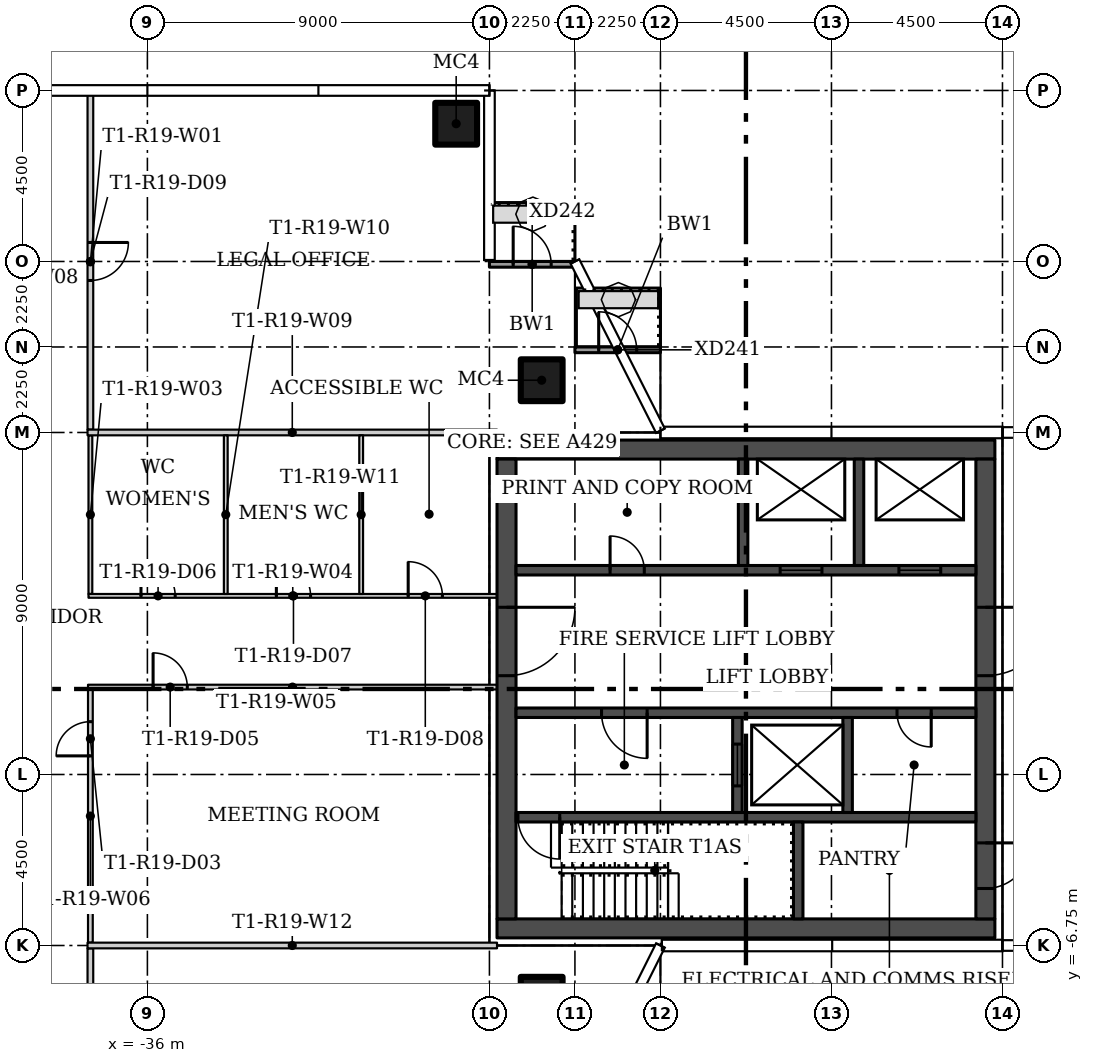
"""IFC4 building model, lengths in metres.
Left out: names, types, materials, properties, quantities, classifications, styles, units other than length and angle.
Written with IfcOpenShell. Run it as: python <this file> out.ifc"""

import sys

from ifc_helpers import new_model, si_unit, direction, frame, frame_2d, origin, origin_2d, place, context, subcontext, project, spatial, rectangle, hollow_rectangle, extrude, element, fill, save


model = new_model("IFC4")
c1 = context("Model", 3, precision=1e-05, world=origin(), true_north=direction((0.0, 1.0)))
c2 = subcontext(c1, "Body", "Model", "MODEL_VIEW")
j1 = project(units=[si_unit("LENGTHUNIT", "METRE"), si_unit("PLANEANGLEUNIT", "RADIAN")], contexts=[c1])
p1 = place(None, origin())
s1 = spatial("IfcSite", under=j1, at=p1, CompositionType="ELEMENT")
p2 = place(p1, origin())
s2 = spatial("IfcBuilding", under=s1, at=p2, CompositionType="ELEMENT")
p3 = place(p2, frame((0.0, 0.0, 170.1)))
s3 = spatial("IfcBuildingStorey", under=s2, at=p3, CompositionType="ELEMENT", Elevation=170.1)
for number, where in (
    (1, (-25.625, 8.125, 0.0)),
    (2, (-25.625, -8.125, 0.0)),
    (3, (-27.875, 14.875, 0.0)),
):
    element("IfcColumn", number, at=place(p3, frame(where)), inside=s3, PredefinedType="COLUMN", context=c2, shape_type="SweptSolid", body=[
        extrude(hollow_rectangle(XDim=1.1, YDim=1.1, WallThickness=0.04, at=origin_2d()), origin(), (0.0, 0.0, 1.0), 3.55),
    ])
p4 = place(p3, frame((-37.5, 15.655, 0.0), z_axis=(0.0, 0.0, 1.0), x_axis=(0.0, -1.0, 0.0)))
e4 = element("IfcWall", 4, at=p4, inside=s3, PredefinedType="PARTITIONING", context=c2, shape_type="SweptSolid", body=[
    extrude(rectangle(XDim=8.83, YDim=0.15, at=frame_2d((4.415, 0.0))), origin(), (0.0, 0.0, 1.0), 3.55),
])
p5 = place(p4, frame((3.905, 0.0, 0.0)))
e5 = element("IfcOpeningElement", 5, at=p5, cuts=e4, PredefinedType="OPENING", context=c2, shape_type="SweptSolid", body=[
    extrude(rectangle(XDim=1.0, YDim=2.4, at=frame_2d((0.5, 1.2))), frame((0.0, 0.085, 0.0), z_axis=(0.0, -1.0, 0.0), x_axis=(1.0, 0.0, 0.0)), (0.0, 0.0, 1.0), 0.17),
])
p6 = place(p3, frame((-37.5, -6.825, 0.0), z_axis=(0.0, 0.0, 1.0), x_axis=(0.0, -1.0, 0.0)))
e6 = element("IfcWall", 6, at=p6, inside=s3, PredefinedType="PARTITIONING", context=c2, shape_type="SweptSolid", body=[
    extrude(rectangle(XDim=13.33, YDim=0.15, at=frame_2d((6.665, 0.0))), origin(), (0.0, 0.0, 1.0), 3.55),
])
p7 = place(p6, frame((5.925, 0.0, 0.0)))
e7 = element("IfcOpeningElement", 7, at=p7, cuts=e6, PredefinedType="OPENING", context=c2, shape_type="SweptSolid", body=[
    extrude(rectangle(XDim=1.5, YDim=2.1, at=frame_2d((0.75, 1.05))), frame((0.0, 0.085, 0.0), z_axis=(0.0, -1.0, 0.0), x_axis=(1.0, 0.0, 0.0)), (0.0, 0.0, 1.0), 0.17),
])
p8 = place(p3, frame((-37.5, 6.675, 0.0), z_axis=(0.0, 0.0, 1.0), x_axis=(0.0, -1.0, 0.0)))
e8 = element("IfcWall", 8, at=p8, inside=s3, PredefinedType="PARTITIONING", context=c2, shape_type="SweptSolid", body=[
    extrude(rectangle(XDim=4.175, YDim=0.1, at=frame_2d((2.087, 0.0))), origin(), (0.0, 0.0, 1.0), 3.55),
])
p9 = place(p3, frame((-37.55, 2.45, 0.0)))
e9 = element("IfcWall", 9, at=p9, inside=s3, PredefinedType="PARTITIONING", context=c2, shape_type="SweptSolid", body=[
    extrude(rectangle(XDim=10.75, YDim=0.1, at=frame_2d((5.375, 0.0))), origin(), (0.0, 0.0, 1.0), 3.55),
])
p10 = place(p9, frame((1.381, 0.0, 0.0)))
e10 = element("IfcOpeningElement", 10, at=p10, cuts=e9, PredefinedType="OPENING", context=c2, shape_type="SweptSolid", body=[
    extrude(rectangle(XDim=0.9, YDim=2.1, at=frame_2d((0.45, 1.05))), frame((0.0, 0.06, 0.0), z_axis=(0.0, -1.0, 0.0), x_axis=(1.0, 0.0, 0.0)), (0.0, 0.0, 1.0), 0.12),
])
p11 = place(p9, frame((4.944, 0.0, 0.0)))
e11 = element("IfcOpeningElement", 11, at=p11, cuts=e9, PredefinedType="OPENING", context=c2, shape_type="SweptSolid", body=[
    extrude(rectangle(XDim=0.9, YDim=2.1, at=frame_2d((0.45, 1.05))), frame((0.0, 0.06, 0.0), z_axis=(0.0, -1.0, 0.0), x_axis=(1.0, 0.0, 0.0)), (0.0, 0.0, 1.0), 0.12),
])
p12 = place(p9, frame((8.413, 0.0, 0.0)))
e12 = element("IfcOpeningElement", 12, at=p12, cuts=e9, PredefinedType="OPENING", context=c2, shape_type="SweptSolid", body=[
    extrude(rectangle(XDim=0.9, YDim=2.1, at=frame_2d((0.45, 1.05))), frame((0.0, 0.06, 0.0), z_axis=(0.0, -1.0, 0.0), x_axis=(1.0, 0.0, 0.0)), (0.0, 0.0, 1.0), 0.12),
])
p13 = place(p3, frame((-37.562, 0.05, 0.0)))
e13 = element("IfcWall", 13, at=p13, inside=s3, PredefinedType="PARTITIONING", context=c2, shape_type="SweptSolid", body=[
    extrude(rectangle(XDim=10.762, YDim=0.125, at=frame_2d((5.381, 0.0))), origin(), (0.0, 0.0, 1.0), 3.55),
])
p14 = place(p13, frame((1.712, 0.0, 0.0)))
e14 = element("IfcOpeningElement", 14, at=p14, cuts=e13, PredefinedType="OPENING", context=c2, shape_type="SweptSolid", body=[
    extrude(rectangle(XDim=0.9, YDim=2.1, at=frame_2d((0.45, 1.05))), frame((0.0, 0.073, 0.0), z_axis=(0.0, -1.0, 0.0), x_axis=(1.0, 0.0, 0.0)), (0.0, 0.0, 1.0), 0.145),
])
p15 = place(p3, frame((-37.5, -6.675, 0.0), z_axis=(0.0, 0.0, 1.0), x_axis=(0.0, 1.0, 0.0)))
e15 = element("IfcWall", 15, at=p15, inside=s3, PredefinedType="PARTITIONING", context=c2, shape_type="SweptSolid", body=[
    extrude(rectangle(XDim=6.662, YDim=0.125, at=frame_2d((3.331, 0.0))), origin(), (0.0, 0.0, 1.0), 3.55),
])
p16 = place(p15, frame((4.915, 0.0, 0.0)))
e16 = element("IfcOpeningElement", 16, at=p16, cuts=e15, PredefinedType="OPENING", context=c2, shape_type="SweptSolid", body=[
    extrude(rectangle(XDim=0.9, YDim=2.1, at=frame_2d((0.45, 1.05))), frame((0.0, 0.073, 0.0), z_axis=(0.0, -1.0, 0.0), x_axis=(1.0, 0.0, 0.0)), (0.0, 0.0, 1.0), 0.145),
])
p17 = place(p3, frame((-37.575, 6.75, 0.0)))
e17 = element("IfcWall", 17, at=p17, inside=s3, PredefinedType="PARTITIONING", context=c2, shape_type="SweptSolid", body=[
    extrude(rectangle(XDim=10.775, YDim=0.15, at=frame_2d((5.387, 0.0))), origin(), (0.0, 0.0, 1.0), 3.55),
])
for number, where, z_axis, x_axis in (
    (18, (-33.938, 2.5, 0.0), (0.0, 0.0, 1.0), (0.0, 1.0, 0.0)),
    (19, (-30.375, 2.5, 0.0), (0.0, 0.0, 1.0), (0.0, 1.0, 0.0)),
):
    element("IfcWall", number, at=place(p3, frame(where, z_axis=z_axis, x_axis=x_axis)), inside=s3, PredefinedType="PARTITIONING", context=c2, shape_type="SweptSolid", body=[
        extrude(rectangle(XDim=4.175, YDim=0.1, at=frame_2d((2.087, 0.0))), origin(), (0.0, 0.0, 1.0), 3.55),
    ])
p18 = place(p3, frame((-26.8, -6.75, 0.0), z_axis=(0.0, 0.0, 1.0), x_axis=(-1.0, 0.0, 0.0)))
e20 = element("IfcWall", 20, at=p18, inside=s3, PredefinedType="PARTITIONING", context=c2, shape_type="SweptSolid", body=[
    extrude(rectangle(XDim=10.775, YDim=0.15, at=frame_2d((5.387, 0.0))), origin(), (0.0, 0.0, 1.0), 3.55),
])
p19 = place(p3, frame((-24.75, 8.925, 0.0)))
e21 = element("IfcWall", 21, at=p19, inside=s3, PredefinedType="SOLIDWALL", context=c2, shape_type="SweptSolid", body=[
    extrude(rectangle(XDim=2.25, YDim=0.15, at=frame_2d((1.125, 0.0))), origin(), (0.0, 0.0, 1.0), 3.45),
])
p20 = place(p19, frame((0.625, 0.0, 0.0)))
e22 = element("IfcOpeningElement", 22, at=p20, cuts=e21, PredefinedType="OPENING", context=c2, shape_type="SweptSolid", body=[
    extrude(rectangle(XDim=1.0, YDim=2.4, at=frame_2d((0.5, 1.2))), frame((0.0, 0.085, 0.0), z_axis=(0.0, -1.0, 0.0), x_axis=(1.0, 0.0, 0.0)), (0.0, 0.0, 1.0), 0.17),
])
p21 = place(p3, frame((-27.0, 11.175, 0.0)))
e23 = element("IfcWall", 23, at=p21, inside=s3, PredefinedType="SOLIDWALL", context=c2, shape_type="SweptSolid", body=[
    extrude(rectangle(XDim=2.25, YDim=0.15, at=frame_2d((1.125, 0.0))), origin(), (0.0, 0.0, 1.0), 3.45),
])
p22 = place(p21, frame((0.625, 0.0, 0.0)))
e24 = element("IfcOpeningElement", 24, at=p22, cuts=e23, PredefinedType="OPENING", context=c2, shape_type="SweptSolid", body=[
    extrude(rectangle(XDim=1.0, YDim=2.4, at=frame_2d((0.5, 1.2))), frame((0.0, 0.085, 0.0), z_axis=(0.0, -1.0, 0.0), x_axis=(1.0, 0.0, 0.0)), (0.0, 0.0, 1.0), 0.17),
])
for number, where in (
    (25, (-26.8, -6.3, 0.0)),
    (26, (-26.8, 6.3, 0.0)),
):
    element("IfcWall", number, at=place(p3, frame(where)), inside=s3, PredefinedType="SHEAR", context=c2, shape_type="SweptSolid", body=[
        extrude(rectangle(XDim=13.1, YDim=0.5, at=frame_2d((6.55, 0.0))), origin(), (0.0, 0.0, 1.0), 3.55),
    ])
p23 = place(p3, frame((-26.55, 6.05, 0.0), z_axis=(0.0, 0.0, 1.0), x_axis=(0.0, -1.0, 0.0)))
e27 = element("IfcWall", 27, at=p23, inside=s3, PredefinedType="SHEAR", context=c2, shape_type="SweptSolid", body=[
    extrude(rectangle(XDim=12.1, YDim=0.5, at=frame_2d((6.05, 0.0))), origin(), (0.0, 0.0, 1.0), 3.55),
])
p24 = place(p23, frame((3.9, 0.0, 0.0)))
e28 = element("IfcOpeningElement", 28, at=p24, cuts=e27, PredefinedType="OPENING", context=c2, shape_type="SweptSolid", body=[
    extrude(rectangle(XDim=1.8, YDim=2.4, at=frame_2d((0.9, 1.2))), frame((0.0, 0.26, 0.0), z_axis=(0.0, -1.0, 0.0), x_axis=(1.0, 0.0, 0.0)), (0.0, 0.0, 1.0), 0.52),
])
p25 = place(p3, frame((-13.95, 6.05, 0.0), z_axis=(0.0, 0.0, 1.0), x_axis=(0.0, -1.0, 0.0)))
e29 = element("IfcWall", 29, at=p25, inside=s3, PredefinedType="SHEAR", context=c2, shape_type="SweptSolid", body=[
    extrude(rectangle(XDim=12.1, YDim=0.5, at=frame_2d((6.05, 0.0))), origin(), (0.0, 0.0, 1.0), 3.55),
])
p26 = place(p25, frame((10.1, 0.0, 0.0)))
e30 = element("IfcOpeningElement", 30, at=p26, cuts=e29, PredefinedType="OPENING", context=c2, shape_type="SweptSolid", body=[
    extrude(rectangle(XDim=1.2, YDim=2.1, at=frame_2d((0.6, 1.05))), frame((0.0, 0.26, 0.0), z_axis=(0.0, -1.0, 0.0), x_axis=(1.0, 0.0, 0.0)), (0.0, 0.0, 1.0), 0.52),
])
p27 = place(p25, frame((3.9, 0.0, 0.0)))
e31 = element("IfcOpeningElement", 31, at=p27, cuts=e29, PredefinedType="OPENING", context=c2, shape_type="SweptSolid", body=[
    extrude(rectangle(XDim=1.8, YDim=2.4, at=frame_2d((0.9, 1.2))), frame((0.0, 0.26, 0.0), z_axis=(0.0, -1.0, 0.0), x_axis=(1.0, 0.0, 0.0)), (0.0, 0.0, 1.0), 0.52),
])
p28 = place(p3, frame((-14.2, -3.375, 0.0), z_axis=(0.0, 0.0, 1.0), x_axis=(-1.0, 0.0, 0.0)))
e32 = element("IfcWall", 32, at=p28, inside=s3, PredefinedType="SHEAR", context=c2, shape_type="SweptSolid", body=[
    extrude(rectangle(XDim=12.1, YDim=0.25, at=frame_2d((6.05, 0.0))), origin(), (0.0, 0.0, 1.0), 3.55),
])
p29 = place(p28, frame((10.95, 0.0, 0.0)))
e33 = element("IfcOpeningElement", 33, at=p29, cuts=e32, PredefinedType="OPENING", context=c2, shape_type="SweptSolid", body=[
    extrude(rectangle(XDim=1.1, YDim=2.1, at=frame_2d((0.55, 1.05))), frame((0.0, 0.135, 0.0), z_axis=(0.0, -1.0, 0.0), x_axis=(1.0, 0.0, 0.0)), (0.0, 0.0, 1.0), 0.27),
])
p30 = place(p3, frame((-18.875, -6.05, 0.0), z_axis=(0.0, 0.0, 1.0), x_axis=(0.0, 1.0, 0.0)))
e34 = element("IfcWall", 34, at=p30, inside=s3, PredefinedType="SHEAR", context=c2, shape_type="SweptSolid", body=[
    extrude(rectangle(XDim=2.55, YDim=0.25, at=frame_2d((1.275, 0.0))), origin(), (0.0, 0.0, 1.0), 3.55),
])
p31 = place(p3, frame((-14.2, -0.625, 0.0), z_axis=(0.0, 0.0, 1.0), x_axis=(-1.0, 0.0, 0.0)))
e35 = element("IfcWall", 35, at=p31, inside=s3, PredefinedType="SHEAR", context=c2, shape_type="SweptSolid", body=[
    extrude(rectangle(XDim=12.1, YDim=0.25, at=frame_2d((6.05, 0.0))), origin(), (0.0, 0.0, 1.0), 3.55),
])
p32 = place(p31, frame((8.65, 0.0, 0.0)))
e36 = element("IfcOpeningElement", 36, at=p32, cuts=e35, PredefinedType="OPENING", context=c2, shape_type="SweptSolid", body=[
    extrude(rectangle(XDim=1.2, YDim=2.1, at=frame_2d((0.6, 1.05))), frame((0.0, 0.135, 0.0), z_axis=(0.0, -1.0, 0.0), x_axis=(1.0, 0.0, 0.0)), (0.0, 0.0, 1.0), 0.27),
])
p33 = place(p31, frame((1.175, 0.0, 0.0)))
e37 = element("IfcOpeningElement", 37, at=p33, cuts=e35, PredefinedType="OPENING", context=c2, shape_type="SweptSolid", body=[
    extrude(rectangle(XDim=0.9, YDim=2.1, at=frame_2d((0.45, 1.05))), frame((0.0, 0.135, 0.0), z_axis=(0.0, -1.0, 0.0), x_axis=(1.0, 0.0, 0.0)), (0.0, 0.0, 1.0), 0.27),
])
p34 = place(p3, frame((-20.475, -3.25, 0.0), z_axis=(0.0, 0.0, 1.0), x_axis=(0.0, 1.0, 0.0)))
e38 = element("IfcWall", 38, at=p34, inside=s3, PredefinedType="SHEAR", context=c2, shape_type="SweptSolid", body=[
    extrude(rectangle(XDim=2.5, YDim=0.25, at=frame_2d((1.25, 0.0))), origin(), (0.0, 0.0, 1.0), 3.55),
])
p35 = place(p34, frame((0.7, 0.0, 0.0)))
e39 = element("IfcOpeningElement", 39, at=p35, cuts=e38, PredefinedType="OPENING", context=c2, shape_type="SweptSolid", body=[
    extrude(rectangle(XDim=1.1, YDim=2.1, at=frame_2d((0.55, 1.05))), frame((0.0, 0.135, 0.0), z_axis=(0.0, -1.0, 0.0), x_axis=(1.0, 0.0, 0.0)), (0.0, 0.0, 1.0), 0.27),
])
p36 = place(p3, frame((-17.575, -3.25, 0.0), z_axis=(0.0, 0.0, 1.0), x_axis=(0.0, 1.0, 0.0)))
e40 = element("IfcWall", 40, at=p36, inside=s3, PredefinedType="SHEAR", context=c2, shape_type="SweptSolid", body=[
    extrude(rectangle(XDim=2.5, YDim=0.25, at=frame_2d((1.25, 0.0))), origin(), (0.0, 0.0, 1.0), 3.55),
])
p37 = place(p3, frame((-26.3, 3.125, 0.0)))
e41 = element("IfcWall", 41, at=p37, inside=s3, PredefinedType="SHEAR", context=c2, shape_type="SweptSolid", body=[
    extrude(rectangle(XDim=12.1, YDim=0.25, at=frame_2d((6.05, 0.0))), origin(), (0.0, 0.0, 1.0), 3.55),
])
p38 = place(p37, frame((6.95, 0.0, 0.0)))
e42 = element("IfcOpeningElement", 42, at=p38, cuts=e41, PredefinedType="OPENING", context=c2, shape_type="SweptSolid", body=[
    extrude(rectangle(XDim=1.1, YDim=2.1, at=frame_2d((0.55, 1.05))), frame((0.0, 0.135, 0.0), z_axis=(0.0, -1.0, 0.0), x_axis=(1.0, 0.0, 0.0)), (0.0, 0.0, 1.0), 0.27),
])
p39 = place(p37, frame((10.075, 0.0, 0.0)))
e43 = element("IfcOpeningElement", 43, at=p39, cuts=e41, PredefinedType="OPENING", context=c2, shape_type="SweptSolid", body=[
    extrude(rectangle(XDim=1.1, YDim=2.1, at=frame_2d((0.55, 1.05))), frame((0.0, 0.135, 0.0), z_axis=(0.0, -1.0, 0.0), x_axis=(1.0, 0.0, 0.0)), (0.0, 0.0, 1.0), 0.27),
])
p40 = place(p37, frame((2.475, 0.0, 0.0)))
e44 = element("IfcOpeningElement", 44, at=p40, cuts=e41, PredefinedType="OPENING", context=c2, shape_type="SweptSolid", body=[
    extrude(rectangle(XDim=0.9, YDim=2.1, at=frame_2d((0.45, 1.05))), frame((0.0, 0.135, 0.0), z_axis=(0.0, -1.0, 0.0), x_axis=(1.0, 0.0, 0.0)), (0.0, 0.0, 1.0), 0.27),
])
for number, where, z_axis, x_axis in (
    (45, (-20.325, 3.25, 0.0), (0.0, 0.0, 1.0), (0.0, 1.0, 0.0)),
    (46, (-17.275, 3.25, 0.0), (0.0, 0.0, 1.0), (0.0, 1.0, 0.0)),
):
    element("IfcWall", number, at=place(p3, frame(where, z_axis=z_axis, x_axis=x_axis)), inside=s3, PredefinedType="SHEAR", context=c2, shape_type="SweptSolid", body=[
        extrude(rectangle(XDim=2.8, YDim=0.25, at=frame_2d((1.4, 0.0))), origin(), (0.0, 0.0, 1.0), 3.55),
    ])
p41 = place(p16, origin())
e47 = element("IfcDoor", 47, at=p41, inside=s3, OperationType="SINGLE_SWING_RIGHT", PredefinedType="DOOR", context=c2, shape_type="SweptSolid", body=[
    extrude(rectangle(XDim=0.9, YDim=2.1, at=frame_2d((0.45, 1.05))), frame((0.0, 0.025, 0.0), z_axis=(0.0, -1.0, 0.0), x_axis=(1.0, 0.0, 0.0)), (0.0, 0.0, 1.0), 0.05),
])
fill(e16, e47)
p42 = place(p14, origin())
e48 = element("IfcDoor", 48, at=p42, inside=s3, OperationType="SINGLE_SWING_LEFT", PredefinedType="DOOR", context=c2, shape_type="SweptSolid", body=[
    extrude(rectangle(XDim=0.9, YDim=2.1, at=frame_2d((0.45, 1.05))), frame((0.0, 0.025, 0.0), z_axis=(0.0, -1.0, 0.0), x_axis=(1.0, 0.0, 0.0)), (0.0, 0.0, 1.0), 0.05),
])
fill(e14, e48)
p43 = place(p10, origin())
e49 = element("IfcDoor", 49, at=p43, inside=s3, OperationType="SINGLE_SWING_LEFT", PredefinedType="DOOR", context=c2, shape_type="SweptSolid", body=[
    extrude(rectangle(XDim=0.9, YDim=2.1, at=frame_2d((0.45, 1.05))), frame((0.0, 0.025, 0.0), z_axis=(0.0, -1.0, 0.0), x_axis=(1.0, 0.0, 0.0)), (0.0, 0.0, 1.0), 0.05),
])
fill(e10, e49)
p44 = place(p11, origin())
e50 = element("IfcDoor", 50, at=p44, inside=s3, OperationType="SINGLE_SWING_LEFT", PredefinedType="DOOR", context=c2, shape_type="SweptSolid", body=[
    extrude(rectangle(XDim=0.9, YDim=2.1, at=frame_2d((0.45, 1.05))), frame((0.0, 0.025, 0.0), z_axis=(0.0, -1.0, 0.0), x_axis=(1.0, 0.0, 0.0)), (0.0, 0.0, 1.0), 0.05),
])
fill(e11, e50)
p45 = place(p12, origin())
e51 = element("IfcDoor", 51, at=p45, inside=s3, OperationType="SINGLE_SWING_RIGHT", PredefinedType="DOOR", context=c2, shape_type="SweptSolid", body=[
    extrude(rectangle(XDim=0.9, YDim=2.1, at=frame_2d((0.45, 1.05))), frame((0.0, 0.025, 0.0), z_axis=(0.0, -1.0, 0.0), x_axis=(1.0, 0.0, 0.0)), (0.0, 0.0, 1.0), 0.05),
])
fill(e12, e51)
p46 = place(p5, origin())
e52 = element("IfcDoor", 52, at=p46, inside=s3, OperationType="SINGLE_SWING_RIGHT", PredefinedType="DOOR", context=c2, shape_type="SweptSolid", body=[
    extrude(rectangle(XDim=1.0, YDim=2.4, at=frame_2d((0.5, 1.2))), frame((0.0, 0.025, 0.0), z_axis=(0.0, -1.0, 0.0), x_axis=(1.0, 0.0, 0.0)), (0.0, 0.0, 1.0), 0.05),
])
fill(e5, e52)
p47 = place(p20, origin())
e53 = element("IfcDoor", 53, at=p47, inside=s3, OperationType="SINGLE_SWING_RIGHT", PredefinedType="DOOR", context=c2, shape_type="SweptSolid", body=[
    extrude(rectangle(XDim=1.0, YDim=2.4, at=frame_2d((0.5, 1.2))), frame((0.0, 0.025, 0.0), z_axis=(0.0, -1.0, 0.0), x_axis=(1.0, 0.0, 0.0)), (0.0, 0.0, 1.0), 0.05),
])
fill(e22, e53)
p48 = place(p22, origin())
e54 = element("IfcDoor", 54, at=p48, inside=s3, OperationType="SINGLE_SWING_LEFT", PredefinedType="DOOR", context=c2, shape_type="SweptSolid", body=[
    extrude(rectangle(XDim=1.0, YDim=2.4, at=frame_2d((0.5, 1.2))), frame((0.0, 0.025, 0.0), z_axis=(0.0, -1.0, 0.0), x_axis=(1.0, 0.0, 0.0)), (0.0, 0.0, 1.0), 0.05),
])
fill(e24, e54)
p49 = place(p24, origin())
e55 = element("IfcDoor", 55, at=p49, inside=s3, OperationType="DOUBLE_DOOR_SINGLE_SWING", PredefinedType="DOOR", context=c2, shape_type="SweptSolid", body=[
    extrude(rectangle(XDim=1.8, YDim=2.4, at=frame_2d((0.9, 1.2))), frame((0.0, 0.025, 0.0), z_axis=(0.0, -1.0, 0.0), x_axis=(1.0, 0.0, 0.0)), (0.0, 0.0, 1.0), 0.05),
])
fill(e28, e55)
p50 = place(p26, origin())
e56 = element("IfcDoor", 56, at=p50, inside=s3, OperationType="SINGLE_SWING_RIGHT", PredefinedType="DOOR", context=c2, shape_type="SweptSolid", body=[
    extrude(rectangle(XDim=1.2, YDim=2.1, at=frame_2d((0.6, 1.05))), frame((0.0, 0.025, 0.0), z_axis=(0.0, -1.0, 0.0), x_axis=(1.0, 0.0, 0.0)), (0.0, 0.0, 1.0), 0.05),
])
fill(e30, e56)
p51 = place(p27, origin())
e57 = element("IfcDoor", 57, at=p51, inside=s3, OperationType="DOUBLE_DOOR_SINGLE_SWING", PredefinedType="DOOR", context=c2, shape_type="SweptSolid", body=[
    extrude(rectangle(XDim=1.8, YDim=2.4, at=frame_2d((0.9, 1.2))), frame((0.0, 0.025, 0.0), z_axis=(0.0, -1.0, 0.0), x_axis=(1.0, 0.0, 0.0)), (0.0, 0.0, 1.0), 0.05),
])
fill(e31, e57)
p52 = place(p29, origin())
e58 = element("IfcDoor", 58, at=p52, inside=s3, OperationType="SINGLE_SWING_RIGHT", PredefinedType="DOOR", context=c2, shape_type="SweptSolid", body=[
    extrude(rectangle(XDim=1.1, YDim=2.1, at=frame_2d((0.55, 1.05))), frame((0.0, 0.025, 0.0), z_axis=(0.0, -1.0, 0.0), x_axis=(1.0, 0.0, 0.0)), (0.0, 0.0, 1.0), 0.05),
])
fill(e33, e58)
p53 = place(p32, origin())
e59 = element("IfcDoor", 59, at=p53, inside=s3, OperationType="SINGLE_SWING_RIGHT", PredefinedType="DOOR", context=c2, shape_type="SweptSolid", body=[
    extrude(rectangle(XDim=1.2, YDim=2.1, at=frame_2d((0.6, 1.05))), frame((0.0, 0.025, 0.0), z_axis=(0.0, -1.0, 0.0), x_axis=(1.0, 0.0, 0.0)), (0.0, 0.0, 1.0), 0.05),
])
fill(e36, e59)
p54 = place(p33, origin())
e60 = element("IfcDoor", 60, at=p54, inside=s3, OperationType="SINGLE_SWING_LEFT", PredefinedType="DOOR", context=c2, shape_type="SweptSolid", body=[
    extrude(rectangle(XDim=0.9, YDim=2.1, at=frame_2d((0.45, 1.05))), frame((0.0, 0.025, 0.0), z_axis=(0.0, -1.0, 0.0), x_axis=(1.0, 0.0, 0.0)), (0.0, 0.0, 1.0), 0.05),
])
fill(e37, e60)
p55 = place(p35, origin())
e61 = element("IfcDoor", 61, at=p55, inside=s3, OperationType="SLIDING_TO_LEFT", PredefinedType="DOOR", context=c2, shape_type="SweptSolid", body=[
    extrude(rectangle(XDim=1.1, YDim=2.1, at=frame_2d((0.55, 1.05))), frame((0.0, 0.025, 0.0), z_axis=(0.0, -1.0, 0.0), x_axis=(1.0, 0.0, 0.0)), (0.0, 0.0, 1.0), 0.05),
])
fill(e39, e61)
p56 = place(p38, origin())
e62 = element("IfcDoor", 62, at=p56, inside=s3, OperationType="SLIDING_TO_LEFT", PredefinedType="DOOR", context=c2, shape_type="SweptSolid", body=[
    extrude(rectangle(XDim=1.1, YDim=2.1, at=frame_2d((0.55, 1.05))), frame((0.0, 0.025, 0.0), z_axis=(0.0, -1.0, 0.0), x_axis=(1.0, 0.0, 0.0)), (0.0, 0.0, 1.0), 0.05),
])
fill(e42, e62)
p57 = place(p39, origin())
e63 = element("IfcDoor", 63, at=p57, inside=s3, OperationType="SLIDING_TO_LEFT", PredefinedType="DOOR", context=c2, shape_type="SweptSolid", body=[
    extrude(rectangle(XDim=1.1, YDim=2.1, at=frame_2d((0.55, 1.05))), frame((0.0, 0.025, 0.0), z_axis=(0.0, -1.0, 0.0), x_axis=(1.0, 0.0, 0.0)), (0.0, 0.0, 1.0), 0.05),
])
fill(e43, e63)
p58 = place(p40, origin())
e64 = element("IfcDoor", 64, at=p58, inside=s3, OperationType="SINGLE_SWING_LEFT", PredefinedType="DOOR", context=c2, shape_type="SweptSolid", body=[
    extrude(rectangle(XDim=0.9, YDim=2.1, at=frame_2d((0.45, 1.05))), frame((0.0, 0.025, 0.0), z_axis=(0.0, -1.0, 0.0), x_axis=(1.0, 0.0, 0.0)), (0.0, 0.0, 1.0), 0.05),
])
fill(e44, e64)
save(model, sys.argv[1])
